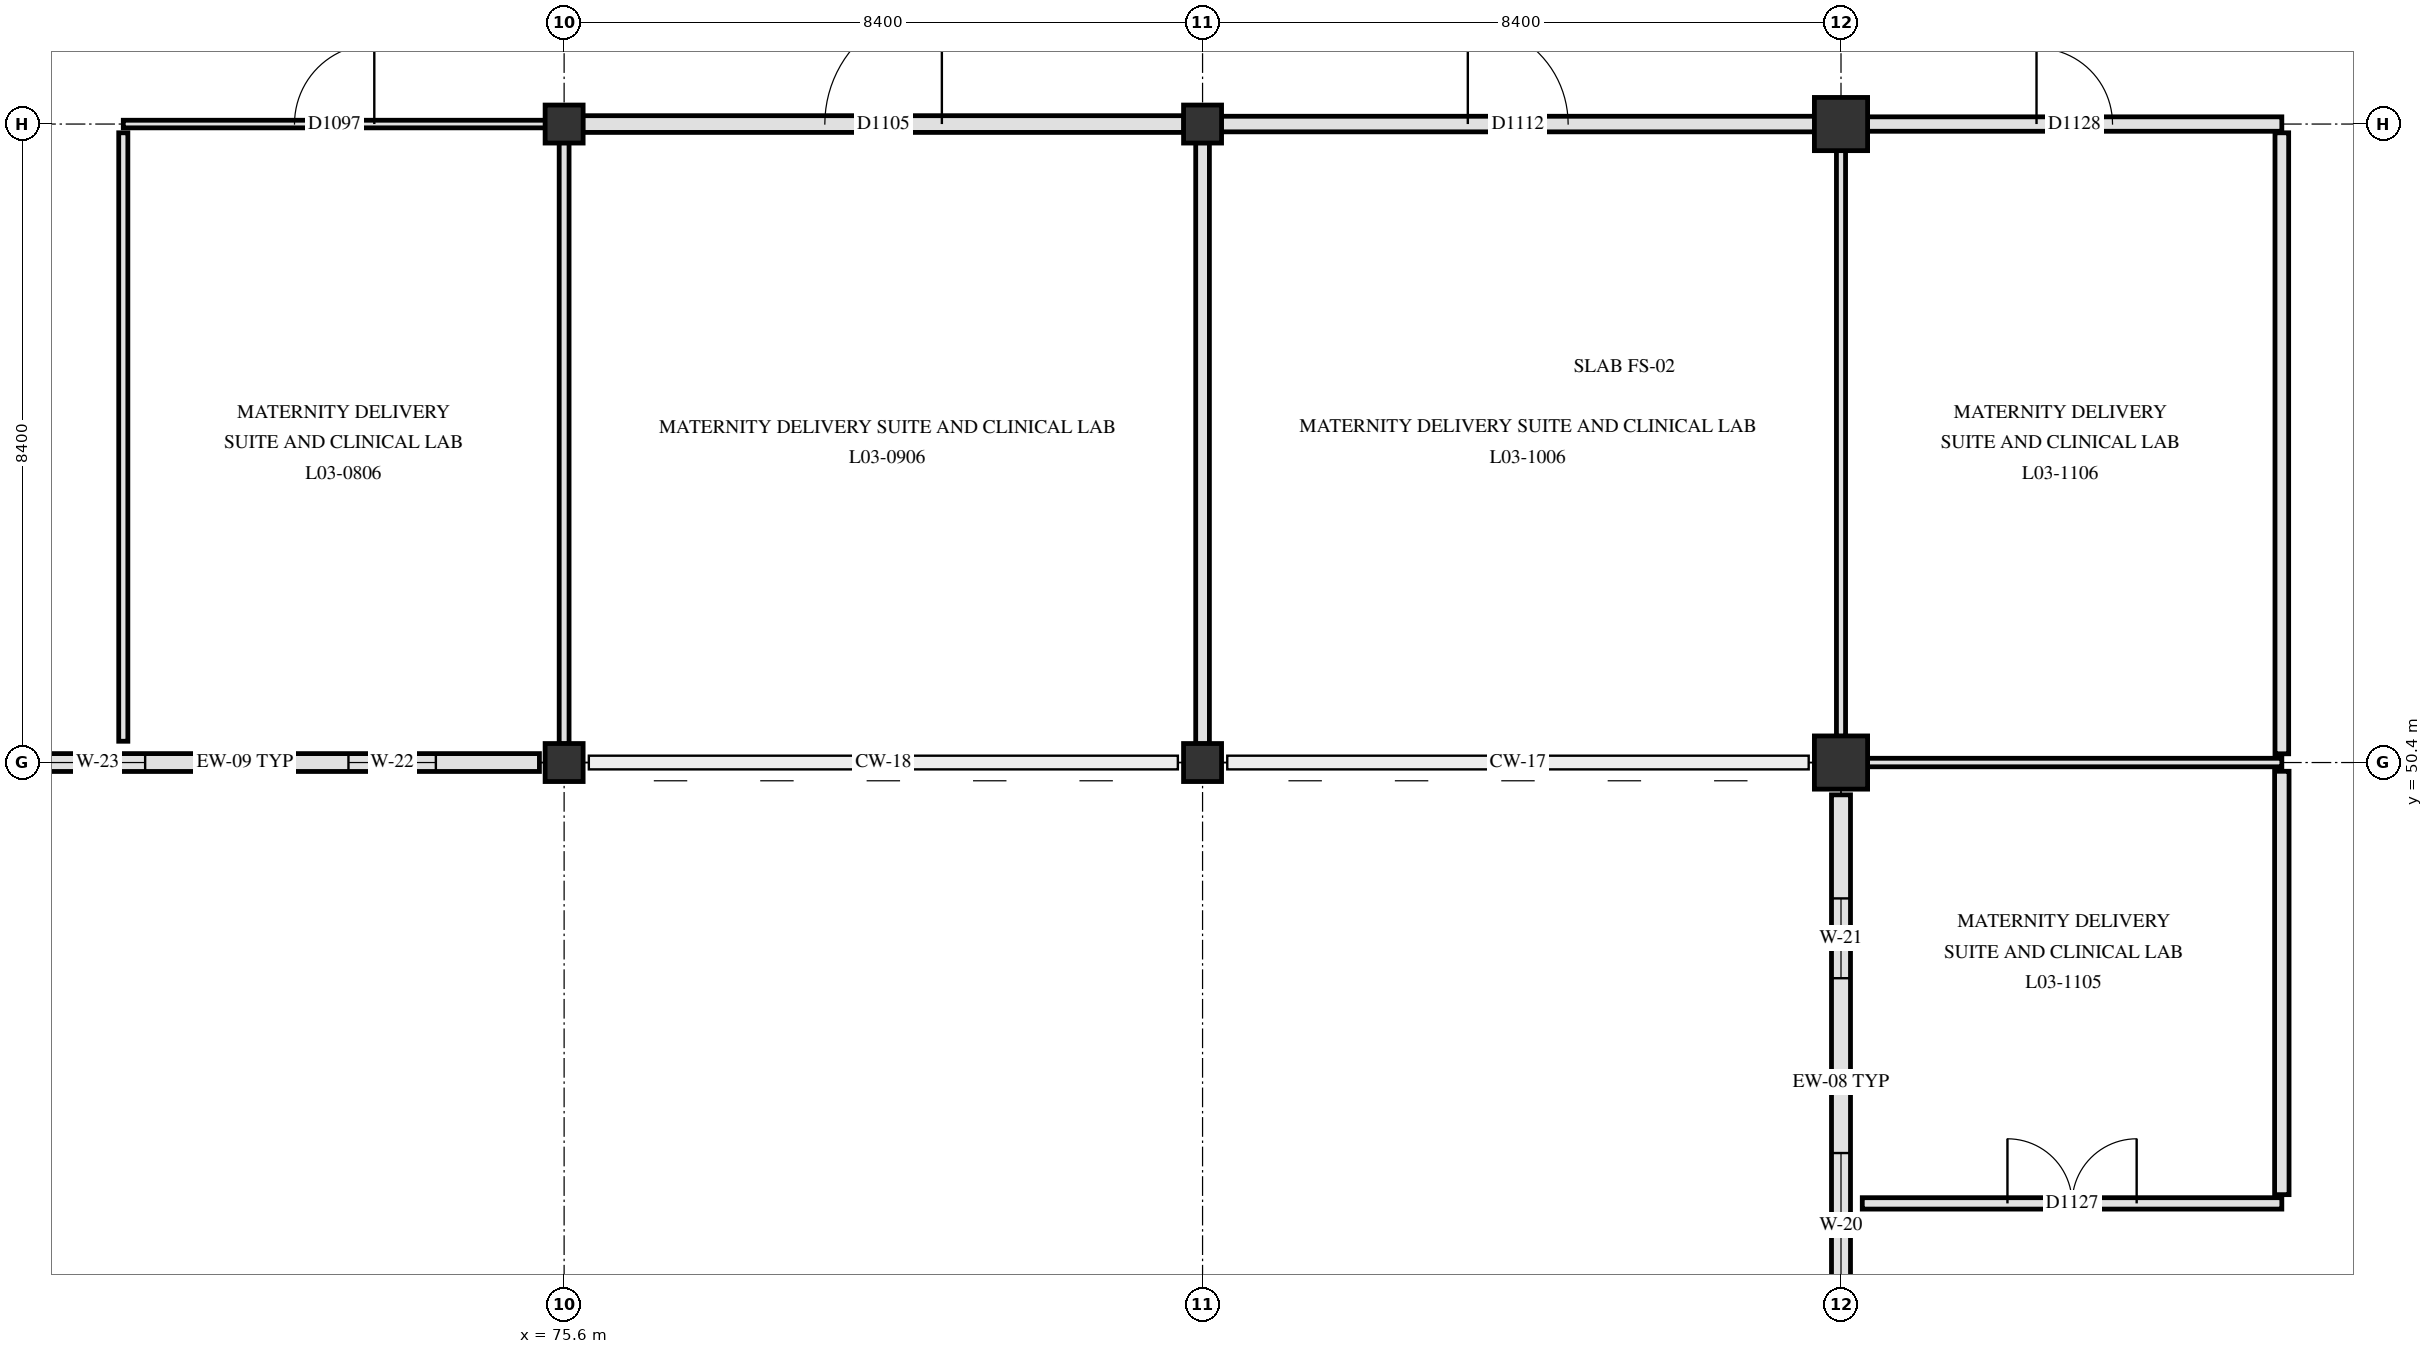
"""IFC4 building model, lengths in metres.
Left out: names, types, materials, properties, quantities, classifications, styles, units other than length and angle.
Written with IfcOpenShell. Run it as: python <this file> out.ifc"""

import sys

from ifc_helpers import new_model, si_unit, direction, frame, frame_2d, origin, origin_2d, place, context, subcontext, project, spatial, rectangle, extrude, element, fill, save


model = new_model("IFC4")
c1 = context("Model", 3, precision=1e-05, world=origin(), true_north=direction((0.0, 1.0)))
c2 = subcontext(c1, "Body", "Model", "MODEL_VIEW")
j1 = project(units=[si_unit("LENGTHUNIT", "METRE"), si_unit("PLANEANGLEUNIT", "RADIAN")], contexts=[c1])
p1 = place(None, origin())
s1 = spatial("IfcSite", under=j1, at=p1, CompositionType="ELEMENT")
p2 = place(p1, origin())
s2 = spatial("IfcBuilding", under=s1, at=p2, CompositionType="ELEMENT")
p3 = place(p2, frame((0.0, 0.0, 14.4)))
s3 = spatial("IfcBuildingStorey", under=s2, at=p3, CompositionType="ELEMENT", Elevation=14.4)
for number, where, z_axis, x_axis in (
    (1, (75.6, 50.4, 0.0), (0.0, 0.0, 1.0), (1.0, 0.0, 0.0)),
    (2, (75.6, 58.8, 0.0), (0.0, 0.0, 1.0), (1.0, 0.0, 0.0)),
    (3, (84.0, 50.4, 0.0), (0.0, 0.0, 1.0), (1.0, 0.0, 0.0)),
    (4, (84.0, 58.8, 0.0), (0.0, 0.0, 1.0), (1.0, 0.0, 0.0)),
):
    element("IfcColumn", number, at=place(p3, frame(where, z_axis=z_axis, x_axis=x_axis)), inside=s3, PredefinedType="COLUMN", context=c2, shape_type="SweptSolid", body=[
        extrude(rectangle(XDim=0.5, YDim=0.5, at=origin_2d()), origin(), (0.0, 0.0, 1.0), 4.2),
    ])
for number, where, z_axis, x_axis in (
    (5, (92.4, 50.4, 0.0), (0.0, 0.0, 1.0), (1.0, 0.0, 0.0)),
    (6, (92.4, 58.8, 0.0), (0.0, 0.0, 1.0), (1.0, 0.0, 0.0)),
):
    element("IfcColumn", number, at=place(p3, frame(where, z_axis=z_axis, x_axis=x_axis)), inside=s3, PredefinedType="COLUMN", context=c2, shape_type="SweptSolid", body=[
        extrude(rectangle(XDim=0.7, YDim=0.7, at=origin_2d()), origin(), (0.0, 0.0, 1.0), 4.2),
    ])
p4 = place(p3, frame((92.4, 42.425, 0.0), z_axis=(0.0, 0.0, 1.0), x_axis=(0.0, 1.0, 0.0)))
e7 = element("IfcWall", 7, at=p4, inside=s3, PredefinedType="SOLIDWALL", context=c2, shape_type="SweptSolid", body=[
    extrude(rectangle(XDim=7.55, YDim=0.25, at=frame_2d((3.775, 0.0))), origin(), (0.0, 0.0, 1.0), 3.19),
])
p5 = place(p4, frame((0.938, 0.0, 0.85)))
e8 = element("IfcOpeningElement", 8, at=p5, cuts=e7, PredefinedType="OPENING", context=c2, shape_type="SweptSolid", body=[
    extrude(rectangle(XDim=1.9, YDim=1.42, at=frame_2d((0.95, 0.71))), frame((0.0, 0.135, 0.0), z_axis=(0.0, -1.0, 0.0), x_axis=(1.0, 0.0, 0.0)), (0.0, 0.0, 1.0), 0.27),
])
p6 = place(p4, frame((5.137, 0.0, 0.85)))
e9 = element("IfcOpeningElement", 9, at=p6, cuts=e7, PredefinedType="OPENING", context=c2, shape_type="SweptSolid", body=[
    extrude(rectangle(XDim=1.05, YDim=1.54, at=frame_2d((0.525, 0.77))), frame((0.0, 0.135, 0.0), z_axis=(0.0, -1.0, 0.0), x_axis=(1.0, 0.0, 0.0)), (0.0, 0.0, 1.0), 0.27),
])
p7 = place(p3, frame((75.275, 50.4, 0.0), z_axis=(0.0, 0.0, 1.0), x_axis=(-1.0, 0.0, 0.0)))
e10 = element("IfcWall", 10, at=p7, inside=s3, PredefinedType="SOLIDWALL", context=c2, shape_type="SweptSolid", body=[
    extrude(rectangle(XDim=7.75, YDim=0.235, at=frame_2d((3.875, 0.0))), origin(), (0.0, 0.0, 1.0), 3.19),
])
p8 = place(p7, frame((1.363, 0.0, 0.85)))
e11 = element("IfcOpeningElement", 11, at=p8, cuts=e10, PredefinedType="OPENING", context=c2, shape_type="SweptSolid", body=[
    extrude(rectangle(XDim=1.15, YDim=1.54, at=frame_2d((0.575, 0.77))), frame((0.0, 0.127, 0.0), z_axis=(0.0, -1.0, 0.0), x_axis=(1.0, 0.0, 0.0)), (0.0, 0.0, 1.0), 0.255),
])
p9 = place(p7, frame((5.188, 0.0, 0.85)))
e12 = element("IfcOpeningElement", 12, at=p9, cuts=e10, PredefinedType="OPENING", context=c2, shape_type="SweptSolid", body=[
    extrude(rectangle(XDim=1.25, YDim=1.54, at=frame_2d((0.625, 0.77))), frame((0.0, 0.127, 0.0), z_axis=(0.0, -1.0, 0.0), x_axis=(1.0, 0.0, 0.0)), (0.0, 0.0, 1.0), 0.255),
])
p10 = place(p3, frame((92.68, 44.6, 0.0), z_axis=(0.0, 0.0, 1.0), x_axis=(1.0, 0.0, 0.0)))
e13 = element("IfcWall", 13, at=p10, inside=s3, PredefinedType="PARTITIONING", context=c2, shape_type="SweptSolid", body=[
    extrude(rectangle(XDim=5.52, YDim=0.15, at=frame_2d((2.76, 0.0))), origin(), (0.0, 0.0, 1.0), 3.89),
])
p11 = place(p10, frame((1.91, 0.0, 0.0)))
e14 = element("IfcOpeningElement", 14, at=p11, cuts=e13, PredefinedType="OPENING", context=c2, shape_type="SweptSolid", body=[
    extrude(rectangle(XDim=1.7, YDim=2.25, at=frame_2d((0.85, 1.125))), frame((0.0, 0.085, 0.0), z_axis=(0.0, -1.0, 0.0), x_axis=(1.0, 0.0, 0.0)), (0.0, 0.0, 1.0), 0.17),
])
p12 = place(p3, frame((92.745, 50.4, 0.0), z_axis=(0.0, 0.0, 1.0), x_axis=(1.0, 0.0, 0.0)))
e15 = element("IfcWall", 15, at=p12, inside=s3, PredefinedType="PARTITIONING", context=c2, shape_type="SweptSolid", body=[
    extrude(rectangle(XDim=5.455, YDim=0.112, at=frame_2d((2.728, 0.0))), origin(), (0.0, 0.0, 1.0), 3.29),
])
p13 = place(p3, frame((69.8, 58.8, 0.0), z_axis=(0.0, 0.0, 1.0), x_axis=(1.0, 0.0, 0.0)))
e16 = element("IfcWall", 16, at=p13, inside=s3, PredefinedType="PARTITIONING", context=c2, shape_type="SweptSolid", body=[
    extrude(rectangle(XDim=5.555, YDim=0.1, at=frame_2d((2.777, 0.0))), origin(), (0.0, 0.0, 1.0), 3.28),
])
p14 = place(p13, frame((2.252, 0.0, 0.0)))
e17 = element("IfcOpeningElement", 17, at=p14, cuts=e16, PredefinedType="OPENING", context=c2, shape_type="SweptSolid", body=[
    extrude(rectangle(XDim=1.05, YDim=2.15, at=frame_2d((0.525, 1.075))), frame((0.0, 0.06, 0.0), z_axis=(0.0, -1.0, 0.0), x_axis=(1.0, 0.0, 0.0)), (0.0, 0.0, 1.0), 0.12),
])
p15 = place(p3, frame((75.845, 58.8, 0.0), z_axis=(0.0, 0.0, 1.0), x_axis=(1.0, 0.0, 0.0)))
e18 = element("IfcWall", 18, at=p15, inside=s3, PredefinedType="PARTITIONING", context=c2, shape_type="SweptSolid", body=[
    extrude(rectangle(XDim=7.91, YDim=0.22, at=frame_2d((3.955, 0.0))), origin(), (0.0, 0.0, 1.0), 3.28),
])
p16 = place(p15, frame((3.185, 0.0, 0.0)))
e19 = element("IfcOpeningElement", 19, at=p16, cuts=e18, PredefinedType="OPENING", context=c2, shape_type="SweptSolid", body=[
    extrude(rectangle(XDim=1.54, YDim=2.24, at=frame_2d((0.77, 1.12))), frame((0.0, 0.12, 0.0), z_axis=(0.0, -1.0, 0.0), x_axis=(1.0, 0.0, 0.0)), (0.0, 0.0, 1.0), 0.24),
])
p17 = place(p3, frame((84.245, 58.8, 0.0), z_axis=(0.0, 0.0, 1.0), x_axis=(1.0, 0.0, 0.0)))
e20 = element("IfcWall", 20, at=p17, inside=s3, PredefinedType="PARTITIONING", context=c2, shape_type="SweptSolid", body=[
    extrude(rectangle(XDim=7.81, YDim=0.205, at=frame_2d((3.905, 0.0))), origin(), (0.0, 0.0, 1.0), 3.28),
])
p18 = place(p17, frame((3.245, 0.0, 0.0)))
e21 = element("IfcOpeningElement", 21, at=p18, cuts=e20, PredefinedType="OPENING", context=c2, shape_type="SweptSolid", body=[
    extrude(rectangle(XDim=1.32, YDim=2.18, at=frame_2d((0.66, 1.09))), frame((0.0, 0.113, 0.0), z_axis=(0.0, -1.0, 0.0), x_axis=(1.0, 0.0, 0.0)), (0.0, 0.0, 1.0), 0.225),
])
p19 = place(p3, frame((92.745, 58.8, 0.0), z_axis=(0.0, 0.0, 1.0), x_axis=(1.0, 0.0, 0.0)))
e22 = element("IfcWall", 22, at=p19, inside=s3, PredefinedType="PARTITIONING", context=c2, shape_type="SweptSolid", body=[
    extrude(rectangle(XDim=5.455, YDim=0.19, at=frame_2d((2.728, 0.0))), origin(), (0.0, 0.0, 1.0), 3.29),
])
p20 = place(p19, frame((2.228, 0.0, 0.0)))
e23 = element("IfcOpeningElement", 23, at=p20, cuts=e22, PredefinedType="OPENING", context=c2, shape_type="SweptSolid", body=[
    extrude(rectangle(XDim=1.0, YDim=2.15, at=frame_2d((0.5, 1.075))), frame((0.0, 0.105, 0.0), z_axis=(0.0, -1.0, 0.0), x_axis=(1.0, 0.0, 0.0)), (0.0, 0.0, 1.0), 0.21),
])
p21 = place(p3, frame((69.8, 50.68, 0.0), z_axis=(0.0, 0.0, 1.0), x_axis=(0.0, 1.0, 0.0)))
e24 = element("IfcWall", 24, at=p21, inside=s3, PredefinedType="PARTITIONING", context=c2, shape_type="SweptSolid", body=[
    extrude(rectangle(XDim=8.005, YDim=0.12, at=frame_2d((4.002, 0.0))), origin(), (0.0, 0.0, 1.0), 3.28),
])
p22 = place(p3, frame((75.6, 50.645, 0.0), z_axis=(0.0, 0.0, 1.0), x_axis=(0.0, 1.0, 0.0)))
e25 = element("IfcWall", 25, at=p22, inside=s3, PredefinedType="PARTITIONING", context=c2, shape_type="SweptSolid", body=[
    extrude(rectangle(XDim=7.91, YDim=0.13, at=frame_2d((3.955, 0.0))), origin(), (0.0, 0.0, 1.0), 3.34),
])
p23 = place(p3, frame((84.0, 50.645, 0.0), z_axis=(0.0, 0.0, 1.0), x_axis=(0.0, 1.0, 0.0)))
e26 = element("IfcWall", 26, at=p23, inside=s3, PredefinedType="PARTITIONING", context=c2, shape_type="SweptSolid", body=[
    extrude(rectangle(XDim=7.91, YDim=0.18, at=frame_2d((3.955, 0.0))), origin(), (0.0, 0.0, 1.0), 3.34),
])
p24 = place(p3, frame((92.4, 50.745, 0.0), z_axis=(0.0, 0.0, 1.0), x_axis=(0.0, 1.0, 0.0)))
e27 = element("IfcWall", 27, at=p24, inside=s3, PredefinedType="PARTITIONING", context=c2, shape_type="SweptSolid", body=[
    extrude(rectangle(XDim=7.71, YDim=0.12, at=frame_2d((3.855, 0.0))), origin(), (0.0, 0.0, 1.0), 3.34),
])
p25 = place(p3, frame((98.2, 44.715, 0.0), z_axis=(0.0, 0.0, 1.0), x_axis=(0.0, 1.0, 0.0)))
e28 = element("IfcWall", 28, at=p25, inside=s3, PredefinedType="PARTITIONING", context=c2, shape_type="SweptSolid", body=[
    extrude(rectangle(XDim=5.57, YDim=0.19, at=frame_2d((2.785, 0.0))), origin(), (0.0, 0.0, 1.0), 3.29),
])
p26 = place(p3, frame((98.2, 50.515, 0.0), z_axis=(0.0, 0.0, 1.0), x_axis=(0.0, 1.0, 0.0)))
e29 = element("IfcWall", 29, at=p26, inside=s3, PredefinedType="PARTITIONING", context=c2, shape_type="SweptSolid", body=[
    extrude(rectangle(XDim=8.17, YDim=0.18, at=frame_2d((4.085, 0.0))), origin(), (0.0, 0.0, 1.0), 3.29),
])
p27 = place(p5, origin())
e30 = element("IfcWindow", 30, at=p27, inside=s3, PartitioningType="SINGLE_PANEL", PredefinedType="WINDOW", context=c2, shape_type="SweptSolid", body=[
    extrude(rectangle(XDim=1.9, YDim=1.42, at=frame_2d((0.95, 0.71))), frame((0.0, 0.03, 0.0), z_axis=(0.0, -1.0, 0.0), x_axis=(1.0, 0.0, 0.0)), (0.0, 0.0, 1.0), 0.06),
])
fill(e8, e30)
p28 = place(p6, origin())
e31 = element("IfcWindow", 31, at=p28, inside=s3, PartitioningType="SINGLE_PANEL", PredefinedType="WINDOW", context=c2, shape_type="SweptSolid", body=[
    extrude(rectangle(XDim=1.05, YDim=1.54, at=frame_2d((0.525, 0.77))), frame((0.0, 0.03, 0.0), z_axis=(0.0, -1.0, 0.0), x_axis=(1.0, 0.0, 0.0)), (0.0, 0.0, 1.0), 0.06),
])
fill(e9, e31)
p29 = place(p8, origin())
e32 = element("IfcWindow", 32, at=p29, inside=s3, PartitioningType="SINGLE_PANEL", PredefinedType="WINDOW", context=c2, shape_type="SweptSolid", body=[
    extrude(rectangle(XDim=1.15, YDim=1.54, at=frame_2d((0.575, 0.77))), frame((0.0, 0.03, 0.0), z_axis=(0.0, -1.0, 0.0), x_axis=(1.0, 0.0, 0.0)), (0.0, 0.0, 1.0), 0.06),
])
fill(e11, e32)
p30 = place(p9, origin())
e33 = element("IfcWindow", 33, at=p30, inside=s3, PartitioningType="SINGLE_PANEL", PredefinedType="WINDOW", context=c2, shape_type="SweptSolid", body=[
    extrude(rectangle(XDim=1.25, YDim=1.54, at=frame_2d((0.625, 0.77))), frame((0.0, 0.03, 0.0), z_axis=(0.0, -1.0, 0.0), x_axis=(1.0, 0.0, 0.0)), (0.0, 0.0, 1.0), 0.06),
])
fill(e12, e33)
p31 = place(p14, origin())
e34 = element("IfcDoor", 34, at=p31, inside=s3, OperationType="SINGLE_SWING_RIGHT", PredefinedType="DOOR", context=c2, shape_type="SweptSolid", body=[
    extrude(rectangle(XDim=1.05, YDim=2.15, at=frame_2d((0.525, 1.075))), frame((0.0, 0.025, 0.0), z_axis=(0.0, -1.0, 0.0), x_axis=(1.0, 0.0, 0.0)), (0.0, 0.0, 1.0), 0.05),
])
fill(e17, e34)
p32 = place(p16, origin())
e35 = element("IfcDoor", 35, at=p32, inside=s3, OperationType="SINGLE_SWING_RIGHT", PredefinedType="DOOR", context=c2, shape_type="SweptSolid", body=[
    extrude(rectangle(XDim=1.54, YDim=2.24, at=frame_2d((0.77, 1.12))), frame((0.0, 0.025, 0.0), z_axis=(0.0, -1.0, 0.0), x_axis=(1.0, 0.0, 0.0)), (0.0, 0.0, 1.0), 0.05),
])
fill(e19, e35)
p33 = place(p18, origin())
e36 = element("IfcDoor", 36, at=p33, inside=s3, OperationType="SINGLE_SWING_LEFT", PredefinedType="DOOR", context=c2, shape_type="SweptSolid", body=[
    extrude(rectangle(XDim=1.32, YDim=2.18, at=frame_2d((0.66, 1.09))), frame((0.0, 0.025, 0.0), z_axis=(0.0, -1.0, 0.0), x_axis=(1.0, 0.0, 0.0)), (0.0, 0.0, 1.0), 0.05),
])
fill(e21, e36)
p34 = place(p11, origin())
e37 = element("IfcDoor", 37, at=p34, inside=s3, OperationType="DOUBLE_SWING_RIGHT", PredefinedType="DOOR", context=c2, shape_type="SweptSolid", body=[
    extrude(rectangle(XDim=1.7, YDim=2.25, at=frame_2d((0.85, 1.125))), frame((0.0, 0.025, 0.0), z_axis=(0.0, -1.0, 0.0), x_axis=(1.0, 0.0, 0.0)), (0.0, 0.0, 1.0), 0.05),
])
fill(e14, e37)
p35 = place(p20, origin())
e38 = element("IfcDoor", 38, at=p35, inside=s3, OperationType="SINGLE_SWING_LEFT", PredefinedType="DOOR", context=c2, shape_type="SweptSolid", body=[
    extrude(rectangle(XDim=1.0, YDim=2.15, at=frame_2d((0.5, 1.075))), frame((0.0, 0.025, 0.0), z_axis=(0.0, -1.0, 0.0), x_axis=(1.0, 0.0, 0.0)), (0.0, 0.0, 1.0), 0.05),
])
fill(e23, e38)
save(model, sys.argv[1])
